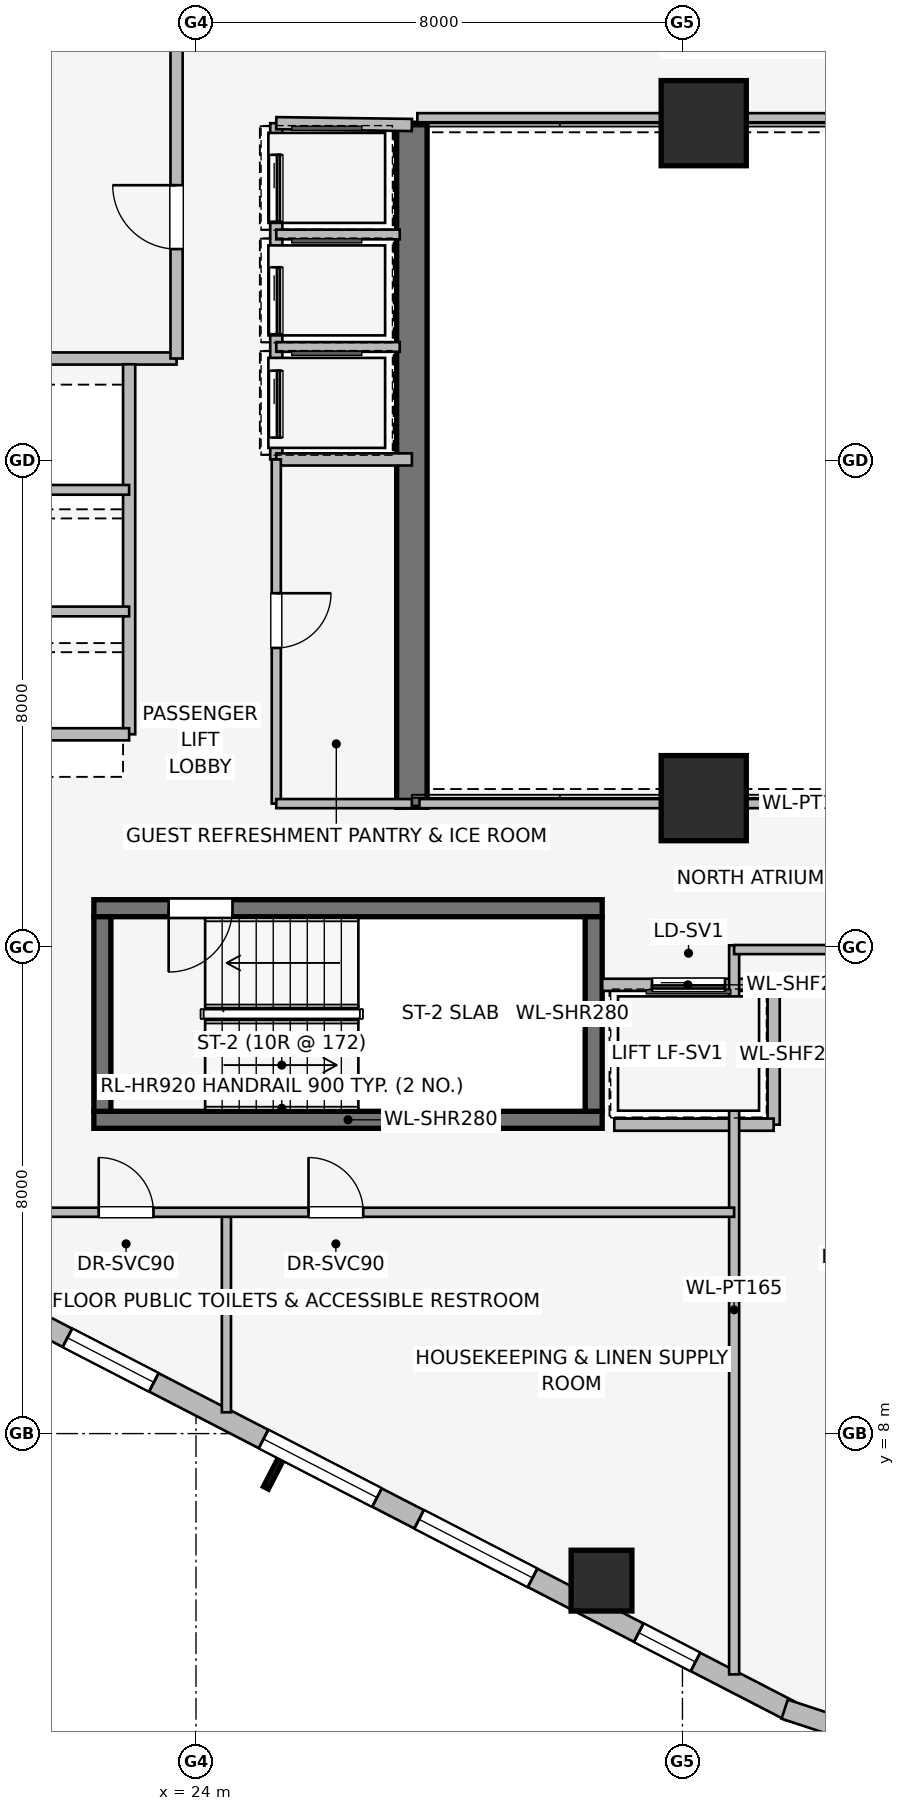
"""IFC4 building model, lengths in metres.
Left out: names, types, materials, properties, quantities, classifications, styles, units other than length and angle.
Written with IfcOpenShell. Run it as: python <this file> out.ifc"""

import sys

from ifc_helpers import new_model, si_unit, direction, frame, frame_2d, origin, origin_2d, place, context, subcontext, project, spatial, rectangle, extrude, element, fill, save


model = new_model("IFC4")
c1 = context("Model", 3, precision=1e-05, world=origin(), true_north=direction((0.0, 1.0)))
c2 = subcontext(c1, "Body", "Model", "MODEL_VIEW")
j1 = project(units=[si_unit("LENGTHUNIT", "METRE"), si_unit("PLANEANGLEUNIT", "RADIAN")], contexts=[c1])
p1 = place(None, origin())
s1 = spatial("IfcSite", under=j1, at=p1, CompositionType="ELEMENT")
p2 = place(p1, origin())
s2 = spatial("IfcBuilding", under=s1, at=p2, CompositionType="ELEMENT")
p3 = place(p2, frame((0.0, 0.0, 136.05)))
s3 = spatial("IfcBuildingStorey", under=s2, at=p3, CompositionType="ELEMENT", Elevation=136.05)
p4 = place(p3, frame((27.55, 29.55, 0.0), z_axis=(0.0, 0.0, 1.0), x_axis=(0.0, -1.0, 0.0)))
e1 = element("IfcWall", 1, at=p4, inside=s3, PredefinedType="SHEAR", context=c2, shape_type="SweptSolid", body=[
    extrude(rectangle(XDim=11.25, YDim=0.5, at=frame_2d((5.625, 0.0))), origin(), (0.0, 0.0, 1.0), 3.45),
])
p5 = place(p3, frame((22.32, 13.16, 0.0), z_axis=(0.0, 0.0, 1.0), x_axis=(1.0, 0.0, 0.0)))
e2 = element("IfcWall", 2, at=p5, inside=s3, PredefinedType="SHEAR", context=c2, shape_type="SweptSolid", body=[
    extrude(rectangle(XDim=8.36, YDim=0.28, at=frame_2d((4.18, 0.0))), origin(), (0.0, 0.0, 1.0), 3.45),
])
p6 = place(p3, frame((30.68, 16.64, 0.0), z_axis=(0.0, 0.0, 1.0), x_axis=(-1.0, 0.0, 0.0)))
e3 = element("IfcWall", 3, at=p6, inside=s3, PredefinedType="SHEAR", context=c2, shape_type="SweptSolid", body=[
    extrude(rectangle(XDim=8.36, YDim=0.28, at=frame_2d((4.18, 0.0))), origin(), (0.0, 0.0, 1.0), 3.45),
])
p7 = place(p6, frame((6.08, 0.0, 0.0)))
e4 = element("IfcOpeningElement", 4, at=p7, cuts=e3, PredefinedType="OPENING", context=c2, shape_type="SweptSolid", body=[
    extrude(rectangle(XDim=1.05, YDim=2.0, at=frame_2d((0.525, 1.0))), frame((0.0, 0.15, 0.0), z_axis=(0.0, -1.0, 0.0), x_axis=(1.0, 0.0, 0.0)), (0.0, 0.0, 1.0), 0.3),
])
for number, where, z_axis, x_axis in (
    (5, (22.46, 16.5, 0.0), (0.0, 0.0, 1.0), (0.0, -1.0, 0.0)),
    (6, (30.54, 13.3, 0.0), (0.0, 0.0, 1.0), (0.0, 1.0, 0.0)),
):
    element("IfcWall", number, at=place(p3, frame(where, z_axis=z_axis, x_axis=x_axis)), inside=s3, PredefinedType="SHEAR", context=c2, shape_type="SweptSolid", body=[
        extrude(rectangle(XDim=3.2, YDim=0.28, at=frame_2d((1.6, 0.0))), origin(), (0.0, 0.0, 1.0), 3.45),
    ])
for number, where, z_axis, x_axis in (
    (7, (32.35, 18.45, 0.0), (0.0, 0.0, 1.0), (1.0, 0.0, 0.0)),
    (8, (32.35, 29.55, 0.0), (0.0, 0.0, 1.0), (1.0, 0.0, 0.0)),
):
    element("IfcColumn", number, at=place(p3, frame(where, z_axis=z_axis, x_axis=x_axis)), inside=s3, PredefinedType="COLUMN", context=c2, shape_type="SweptSolid", body=[
        extrude(rectangle(XDim=1.4, YDim=1.4, at=origin_2d()), origin(), (0.0, 0.0, 1.0), 3.45),
    ])
p8 = place(p3, frame((30.669, 5.582, 0.0), z_axis=(0.0, 0.0, 1.0), x_axis=(1.0, 0.0, 0.0)))
e9 = element("IfcColumn", 9, at=p8, inside=s3, PredefinedType="COLUMN", context=c2, shape_type="SweptSolid", body=[
    extrude(rectangle(XDim=1.0, YDim=1.0, at=origin_2d()), origin(), (0.0, 0.0, 1.0), 3.45),
])
p9 = place(p3, frame((33.769, 3.442, 0.0), z_axis=(0.0, 0.0, 1.0), x_axis=(-0.888613612362, 0.458656568606, 0.0)))
e10 = element("IfcWall", 10, at=p9, inside=s3, PredefinedType="STANDARD", context=c2, shape_type="SweptSolid", body=[
    extrude(rectangle(XDim=18.681, YDim=0.34, at=frame_2d((9.34, 0.0))), origin(), (0.0, 0.0, 1.0), 3.16),
])
p10 = place(p9, frame((1.75, 0.0, 0.75)))
e11 = element("IfcOpeningElement", 11, at=p10, cuts=e10, PredefinedType="OPENING", context=c2, shape_type="SweptSolid", body=[
    extrude(rectangle(XDim=1.05, YDim=1.4, at=frame_2d((0.525, 0.7))), frame((0.0, 0.18, 0.0), z_axis=(0.0, -1.0, 0.0), x_axis=(1.0, 0.0, 0.0)), (0.0, 0.0, 1.0), 0.36),
])
p11 = place(p9, frame((4.765, 0.0, 0.75)))
e12 = element("IfcOpeningElement", 12, at=p11, cuts=e10, PredefinedType="OPENING", context=c2, shape_type="SweptSolid", body=[
    extrude(rectangle(XDim=2.1, YDim=1.5, at=frame_2d((1.05, 0.75))), frame((0.0, 0.18, 0.0), z_axis=(0.0, -1.0, 0.0), x_axis=(1.0, 0.0, 0.0)), (0.0, 0.0, 1.0), 0.36),
])
p12 = place(p9, frame((7.644, 0.0, 0.75)))
e13 = element("IfcOpeningElement", 13, at=p12, cuts=e10, PredefinedType="OPENING", context=c2, shape_type="SweptSolid", body=[
    extrude(rectangle(XDim=2.1, YDim=1.5, at=frame_2d((1.05, 0.75))), frame((0.0, 0.18, 0.0), z_axis=(0.0, -1.0, 0.0), x_axis=(1.0, 0.0, 0.0)), (0.0, 0.0, 1.0), 0.36),
])
p13 = place(p9, frame((11.774, 0.0, 0.75)))
e14 = element("IfcOpeningElement", 14, at=p13, cuts=e10, PredefinedType="OPENING", context=c2, shape_type="SweptSolid", body=[
    extrude(rectangle(XDim=1.6, YDim=1.55, at=frame_2d((0.8, 0.775))), frame((0.0, 0.18, 0.0), z_axis=(0.0, -1.0, 0.0), x_axis=(1.0, 0.0, 0.0)), (0.0, 0.0, 1.0), 0.36),
])
p14 = place(p9, frame((15.92, 0.0, 0.75)))
e15 = element("IfcOpeningElement", 15, at=p14, cuts=e10, PredefinedType="OPENING", context=c2, shape_type="SweptSolid", body=[
    extrude(rectangle(XDim=1.05, YDim=1.4, at=frame_2d((0.525, 0.7))), frame((0.0, 0.18, 0.0), z_axis=(0.0, -1.0, 0.0), x_axis=(1.0, 0.0, 0.0)), (0.0, 0.0, 1.0), 0.36),
])
p15 = place(p3, frame((35.317, 2.93, 0.0), z_axis=(0.0, 0.0, 1.0), x_axis=(-0.949937416267, 0.312440242569, 0.0)))
e16 = element("IfcWall", 16, at=p15, inside=s3, PredefinedType="STANDARD", context=c2, shape_type="SweptSolid", body=[
    extrude(rectangle(XDim=1.722, YDim=0.33, at=frame_2d((0.861, 0.0))), origin(), (0.0, 0.0, 1.0), 3.16),
])
p16 = place(p3, frame((20.793, 25.68, 0.0), z_axis=(0.0, 0.0, 1.0), x_axis=(1.0, 0.0, 0.0)))
e17 = element("IfcWall", 17, at=p16, inside=s3, PredefinedType="PARTITIONING", context=c2, shape_type="SweptSolid", body=[
    extrude(rectangle(XDim=2.887, YDim=0.2, at=frame_2d((1.443, 0.0))), origin(), (0.0, 0.0, 1.0), 3.16),
])
p17 = place(p3, frame((23.68, 25.68, 0.0), z_axis=(0.0, 0.0, 1.0), x_axis=(0.0, 1.0, 0.0)))
e18 = element("IfcWall", 18, at=p17, inside=s3, PredefinedType="PARTITIONING", context=c2, shape_type="SweptSolid", body=[
    extrude(rectangle(XDim=5.54, YDim=0.2, at=frame_2d((2.77, 0.0))), origin(), (0.0, 0.0, 1.0), 3.16),
])
p18 = place(p17, frame((1.8, 0.0, 0.0)))
e19 = element("IfcOpeningElement", 19, at=p18, cuts=e18, PredefinedType="OPENING", context=c2, shape_type="SweptSolid", body=[
    extrude(rectangle(XDim=1.05, YDim=2.0, at=frame_2d((0.525, 1.0))), frame((0.0, 0.11, 0.0), z_axis=(0.0, -1.0, 0.0), x_axis=(1.0, 0.0, 0.0)), (0.0, 0.0, 1.0), 0.22),
])
p19 = place(p3, frame((33.5, 15.38, 0.0), z_axis=(0.0, 0.0, 1.0), x_axis=(-1.0, 0.0, 0.0)))
e20 = element("IfcWall", 20, at=p19, inside=s3, PredefinedType="PARTITIONING", context=c2, shape_type="SweptSolid", body=[
    extrude(rectangle(XDim=2.82, YDim=0.2, at=frame_2d((1.41, 0.0))), origin(), (0.0, 0.0, 1.0), 3.16),
])
p20 = place(p19, frame((0.8, 0.0, 0.0)))
e21 = element("IfcOpeningElement", 21, at=p20, cuts=e20, PredefinedType="OPENING", context=c2, shape_type="SweptSolid", body=[
    extrude(rectangle(XDim=1.2, YDim=2.2, at=frame_2d((0.6, 1.1))), frame((0.0, 0.11, 0.0), z_axis=(0.0, -1.0, 0.0), x_axis=(1.0, 0.0, 0.0)), (0.0, 0.0, 1.0), 0.22),
])
p21 = place(p3, frame((33.5, 13.08, 0.0), z_axis=(0.0, 0.0, 1.0), x_axis=(0.0, 1.0, 0.0)))
e22 = element("IfcWall", 22, at=p21, inside=s3, PredefinedType="PARTITIONING", context=c2, shape_type="SweptSolid", body=[
    extrude(rectangle(XDim=2.3, YDim=0.2, at=frame_2d((1.15, 0.0))), origin(), (0.0, 0.0, 1.0), 3.16),
])
p22 = place(p3, frame((30.879, 13.08, 0.0), z_axis=(0.0, 0.0, 1.0), x_axis=(1.0, 0.0, 0.0)))
e23 = element("IfcWall", 23, at=p22, inside=s3, PredefinedType="PARTITIONING", context=c2, shape_type="SweptSolid", body=[
    extrude(rectangle(XDim=2.621, YDim=0.2, at=frame_2d((1.311, 0.0))), origin(), (0.0, 0.0, 1.0), 3.16),
])
p23 = place(p3, frame((22.9, 19.5, 0.0), z_axis=(0.0, 0.0, 1.0), x_axis=(0.0, 1.0, 0.0)))
e24 = element("IfcWall", 24, at=p23, inside=s3, PredefinedType="PARTITIONING", context=c2, shape_type="SweptSolid", body=[
    extrude(rectangle(XDim=6.085, YDim=0.2, at=frame_2d((3.042, 0.0))), origin(), (0.0, 0.0, 1.0), 3.16),
])
p24 = place(p3, frame((20.49, 19.5, 0.0), z_axis=(0.0, 0.0, 1.0), x_axis=(1.0, 0.0, 0.0)))
e25 = element("IfcWall", 25, at=p24, inside=s3, PredefinedType="PARTITIONING", context=c2, shape_type="SweptSolid", body=[
    extrude(rectangle(XDim=2.41, YDim=0.2, at=frame_2d((1.205, 0.0))), origin(), (0.0, 0.0, 1.0), 2.06),
])
for number, where, z_axis, x_axis in (
    (26, (20.55, 21.52, 0.0), (0.0, 0.0, 1.0), (1.0, 0.0, 0.0)),
    (27, (20.55, 23.52, 0.0), (0.0, 0.0, 1.0), (1.0, 0.0, 0.0)),
):
    element("IfcWall", number, at=place(p3, frame(where, z_axis=z_axis, x_axis=x_axis)), inside=s3, PredefinedType="PARTITIONING", context=c2, shape_type="SweptSolid", body=[
        extrude(rectangle(XDim=2.35, YDim=0.16, at=frame_2d((1.175, 0.0))), origin(), (0.0, 0.0, 1.0), 3.16),
    ])
p25 = place(p3, frame((25.32, 29.55, 0.0), z_axis=(0.0, 0.0, 1.0), x_axis=(0.0, -1.0, 0.0)))
e28 = element("IfcWall", 28, at=p25, inside=s3, PredefinedType="PARTITIONING", context=c2, shape_type="SweptSolid", body=[
    extrude(rectangle(XDim=5.53, YDim=0.2, at=frame_2d((2.765, 0.0))), origin(), (0.0, 0.0, 1.0), 3.16),
])
p26 = place(p25, frame((0.52, 0.0, 0.0)))
e29 = element("IfcOpeningElement", 29, at=p26, cuts=e28, PredefinedType="OPENING", context=c2, shape_type="SweptSolid", body=[
    extrude(rectangle(XDim=1.1, YDim=2.2, at=frame_2d((0.55, 1.1))), frame((0.0, 0.11, 0.0), z_axis=(0.0, -1.0, 0.0), x_axis=(1.0, 0.0, 0.0)), (0.0, 0.0, 1.0), 0.22),
])
p27 = place(p25, frame((2.37, 0.0, 0.0)))
e30 = element("IfcOpeningElement", 30, at=p27, cuts=e28, PredefinedType="OPENING", context=c2, shape_type="SweptSolid", body=[
    extrude(rectangle(XDim=1.1, YDim=2.2, at=frame_2d((0.55, 1.1))), frame((0.0, 0.11, 0.0), z_axis=(0.0, -1.0, 0.0), x_axis=(1.0, 0.0, 0.0)), (0.0, 0.0, 1.0), 0.22),
])
p28 = place(p25, frame((4.07, 0.0, 0.0)))
e31 = element("IfcOpeningElement", 31, at=p28, cuts=e28, PredefinedType="OPENING", context=c2, shape_type="SweptSolid", body=[
    extrude(rectangle(XDim=1.1, YDim=2.2, at=frame_2d((0.55, 1.1))), frame((0.0, 0.11, 0.0), z_axis=(0.0, -1.0, 0.0), x_axis=(1.0, 0.0, 0.0)), (0.0, 0.0, 1.0), 0.22),
])
p29 = place(p3, frame((27.55, 29.52, 0.0), z_axis=(0.0, 0.0, 1.0), x_axis=(-0.999909343457, 0.013464949556, 0.0)))
e32 = element("IfcWall", 32, at=p29, inside=s3, PredefinedType="PARTITIONING", context=c2, shape_type="SweptSolid", body=[
    extrude(rectangle(XDim=2.23, YDim=0.2, at=frame_2d((1.115, 0.0))), origin(), (0.0, 0.0, 1.0), 2.06),
])
p30 = place(p3, frame((25.32, 24.02, 0.0), z_axis=(0.0, 0.0, 1.0), x_axis=(1.0, 0.0, 0.0)))
e33 = element("IfcWall", 33, at=p30, inside=s3, PredefinedType="PARTITIONING", context=c2, shape_type="SweptSolid", body=[
    extrude(rectangle(XDim=2.23, YDim=0.2, at=frame_2d((1.115, 0.0))), origin(), (0.0, 0.0, 1.0), 3.16),
])
for number, where, z_axis, x_axis in (
    (34, (25.32, 25.87, 0.0), (0.0, 0.0, 1.0), (1.0, 0.0, 0.0)),
    (35, (25.32, 27.72, 0.0), (0.0, 0.0, 1.0), (1.0, 0.0, 0.0)),
):
    element("IfcWall", number, at=place(p3, frame(where, z_axis=z_axis, x_axis=x_axis)), inside=s3, PredefinedType="PARTITIONING", context=c2, shape_type="SweptSolid", body=[
        extrude(rectangle(XDim=2.03, YDim=0.16, at=frame_2d((1.015, 0.0))), origin(), (0.0, 0.0, 1.0), 3.16),
    ])
p31 = place(p3, frame((25.32, 24.02, 0.0), z_axis=(0.0, 0.0, 1.0), x_axis=(0.0, -1.0, 0.0)))
e36 = element("IfcWall", 36, at=p31, inside=s3, PredefinedType="PARTITIONING", context=c2, shape_type="SweptSolid", body=[
    extrude(rectangle(XDim=5.66, YDim=0.15, at=frame_2d((2.83, 0.0))), origin(), (0.0, 0.0, 1.0), 3.16),
])
p32 = place(p31, frame((2.2, 0.0, 0.0)))
e37 = element("IfcOpeningElement", 37, at=p32, cuts=e36, PredefinedType="OPENING", context=c2, shape_type="SweptSolid", body=[
    extrude(rectangle(XDim=0.9, YDim=2.0, at=frame_2d((0.45, 1.0))), frame((0.0, 0.085, 0.0), z_axis=(0.0, -1.0, 0.0), x_axis=(1.0, 0.0, 0.0)), (0.0, 0.0, 1.0), 0.17),
])
p33 = place(p3, frame((25.32, 18.36, 0.0), z_axis=(0.0, 0.0, 1.0), x_axis=(1.0, 0.0, 0.0)))
e38 = element("IfcWall", 38, at=p33, inside=s3, PredefinedType="PARTITIONING", context=c2, shape_type="SweptSolid", body=[
    extrude(rectangle(XDim=2.23, YDim=0.15, at=frame_2d((1.115, 0.0))), origin(), (0.0, 0.0, 1.0), 3.16),
])
p34 = place(p3, frame((27.675, 18.36, 0.0), z_axis=(0.0, 0.0, 1.0), x_axis=(1.0, 0.0, 0.0)))
e39 = element("IfcWall", 39, at=p34, inside=s3, PredefinedType="PARTITIONING", context=c2, shape_type="SweptSolid", body=[
    extrude(rectangle(XDim=12.165, YDim=0.15, at=frame_2d((6.083, 0.0))), origin(), (0.0, 0.0, 1.0), 2.301),
])
p35 = place(p3, frame((39.84, 29.64, 0.0), z_axis=(0.0, 0.0, 1.0), x_axis=(-1.0, 0.0, 0.0)))
e40 = element("IfcWall", 40, at=p35, inside=s3, PredefinedType="PARTITIONING", context=c2, shape_type="SweptSolid", body=[
    extrude(rectangle(XDim=12.2, YDim=0.15, at=frame_2d((6.1, 0.0))), origin(), (0.0, 0.0, 1.0), 2.301),
])
p36 = place(p3, frame((32.85, 4.04, 0.0), z_axis=(0.0, 0.0, 1.0), x_axis=(0.0, 1.0, 0.0)))
e41 = element("IfcWall", 41, at=p36, inside=s3, PredefinedType="PARTITIONING", context=c2, shape_type="SweptSolid", body=[
    extrude(rectangle(XDim=11.99, YDim=0.165, at=frame_2d((5.995, 0.0))), origin(), (0.0, 0.0, 1.0), 3.16),
])
p37 = place(p3, frame((24.5, 8.35, 0.0), z_axis=(0.0, 0.0, 1.0), x_axis=(0.0, 1.0, 0.0)))
e42 = element("IfcWall", 42, at=p37, inside=s3, PredefinedType="PARTITIONING", context=c2, shape_type="SweptSolid", body=[
    extrude(rectangle(XDim=3.29, YDim=0.15, at=frame_2d((1.645, 0.0))), origin(), (0.0, 0.0, 1.0), 3.16),
])
p38 = place(p3, frame((18.126, 11.64, 0.0), z_axis=(0.0, 0.0, 1.0), x_axis=(1.0, 0.0, 0.0)))
e43 = element("IfcWall", 43, at=p38, inside=s3, PredefinedType="PARTITIONING", context=c2, shape_type="SweptSolid", body=[
    extrude(rectangle(XDim=14.724, YDim=0.15, at=frame_2d((7.362, 0.0))), origin(), (0.0, 0.0, 1.0), 3.16),
])
p39 = place(p38, frame((4.274, 0.0, 0.0)))
e44 = element("IfcOpeningElement", 44, at=p39, cuts=e43, PredefinedType="OPENING", context=c2, shape_type="SweptSolid", body=[
    extrude(rectangle(XDim=0.9, YDim=2.0, at=frame_2d((0.45, 1.0))), frame((0.0, 0.085, 0.0), z_axis=(0.0, -1.0, 0.0), x_axis=(1.0, 0.0, 0.0)), (0.0, 0.0, 1.0), 0.17),
])
p40 = place(p38, frame((7.724, 0.0, 0.0)))
e45 = element("IfcOpeningElement", 45, at=p40, cuts=e43, PredefinedType="OPENING", context=c2, shape_type="SweptSolid", body=[
    extrude(rectangle(XDim=0.9, YDim=2.0, at=frame_2d((0.45, 1.0))), frame((0.0, 0.085, 0.0), z_axis=(0.0, -1.0, 0.0), x_axis=(1.0, 0.0, 0.0)), (0.0, 0.0, 1.0), 0.17),
])
p41 = place(p3, frame((32.85, 15.96, 0.0), z_axis=(0.0, 0.0, 1.0), x_axis=(1.0, 0.0, 0.0)))
e46 = element("IfcWall", 46, at=p41, inside=s3, PredefinedType="PARTITIONING", context=c2, shape_type="SweptSolid", body=[
    extrude(rectangle(XDim=24.358, YDim=0.15, at=frame_2d((12.179, 0.0))), origin(), (0.0, 0.0, 1.0), 3.16),
])
p42 = place(p41, frame((11.713, 0.0, 0.0)))
e47 = element("IfcOpeningElement", 47, at=p42, cuts=e46, PredefinedType="OPENING", context=c2, shape_type="SweptSolid", body=[
    extrude(rectangle(XDim=0.96, YDim=2.0, at=frame_2d((0.48, 1.0))), frame((0.0, 0.085, 0.0), z_axis=(0.0, -1.0, 0.0), x_axis=(1.0, 0.0, 0.0)), (0.0, 0.0, 1.0), 0.17),
])
p43 = place(p10, origin())
e48 = element("IfcWindow", 48, at=p43, inside=s3, PartitioningType="SINGLE_PANEL", PredefinedType="WINDOW", context=c2, shape_type="SweptSolid", body=[
    extrude(rectangle(XDim=1.05, YDim=1.4, at=frame_2d((0.525, 0.7))), frame((0.0, 0.03, 0.0), z_axis=(0.0, -1.0, 0.0), x_axis=(1.0, 0.0, 0.0)), (0.0, 0.0, 1.0), 0.06),
])
fill(e11, e48)
p44 = place(p11, origin())
e49 = element("IfcWindow", 49, at=p44, inside=s3, PartitioningType="SINGLE_PANEL", PredefinedType="WINDOW", context=c2, shape_type="SweptSolid", body=[
    extrude(rectangle(XDim=2.1, YDim=1.5, at=frame_2d((1.05, 0.75))), frame((0.0, 0.03, 0.0), z_axis=(0.0, -1.0, 0.0), x_axis=(1.0, 0.0, 0.0)), (0.0, 0.0, 1.0), 0.06),
])
fill(e12, e49)
p45 = place(p12, origin())
e50 = element("IfcWindow", 50, at=p45, inside=s3, PartitioningType="SINGLE_PANEL", PredefinedType="WINDOW", context=c2, shape_type="SweptSolid", body=[
    extrude(rectangle(XDim=2.1, YDim=1.5, at=frame_2d((1.05, 0.75))), frame((0.0, 0.03, 0.0), z_axis=(0.0, -1.0, 0.0), x_axis=(1.0, 0.0, 0.0)), (0.0, 0.0, 1.0), 0.06),
])
fill(e13, e50)
p46 = place(p13, origin())
e51 = element("IfcWindow", 51, at=p46, inside=s3, PartitioningType="SINGLE_PANEL", PredefinedType="WINDOW", context=c2, shape_type="SweptSolid", body=[
    extrude(rectangle(XDim=1.6, YDim=1.55, at=frame_2d((0.8, 0.775))), frame((0.0, 0.03, 0.0), z_axis=(0.0, -1.0, 0.0), x_axis=(1.0, 0.0, 0.0)), (0.0, 0.0, 1.0), 0.06),
])
fill(e14, e51)
p47 = place(p7, origin())
e52 = element("IfcDoor", 52, at=p47, inside=s3, OperationType="SINGLE_SWING_RIGHT", PredefinedType="DOOR", context=c2, shape_type="SweptSolid", body=[
    extrude(rectangle(XDim=1.05, YDim=2.0, at=frame_2d((0.525, 1.0))), frame((0.0, 0.025, 0.0), z_axis=(0.0, -1.0, 0.0), x_axis=(1.0, 0.0, 0.0)), (0.0, 0.0, 1.0), 0.05),
])
fill(e4, e52)
p48 = place(p18, origin())
e53 = element("IfcDoor", 53, at=p48, inside=s3, OperationType="SINGLE_SWING_RIGHT", PredefinedType="DOOR", context=c2, shape_type="SweptSolid", body=[
    extrude(rectangle(XDim=1.05, YDim=2.0, at=frame_2d((0.525, 1.0))), frame((0.0, 0.025, 0.0), z_axis=(0.0, -1.0, 0.0), x_axis=(1.0, 0.0, 0.0)), (0.0, 0.0, 1.0), 0.05),
])
fill(e19, e53)
p49 = place(p20, origin())
e54 = element("IfcDoor", 54, at=p49, inside=s3, OperationType="SLIDING_TO_RIGHT", PredefinedType="DOOR", context=c2, shape_type="SweptSolid", body=[
    extrude(rectangle(XDim=1.2, YDim=2.2, at=frame_2d((0.6, 1.1))), frame((0.0, 0.025, 0.0), z_axis=(0.0, -1.0, 0.0), x_axis=(1.0, 0.0, 0.0)), (0.0, 0.0, 1.0), 0.05),
])
fill(e21, e54)
p50 = place(p26, origin())
e55 = element("IfcDoor", 55, at=p50, inside=s3, OperationType="SLIDING_TO_LEFT", PredefinedType="DOOR", context=c2, shape_type="SweptSolid", body=[
    extrude(rectangle(XDim=1.1, YDim=2.2, at=frame_2d((0.55, 1.1))), frame((0.0, 0.025, 0.0), z_axis=(0.0, -1.0, 0.0), x_axis=(1.0, 0.0, 0.0)), (0.0, 0.0, 1.0), 0.05),
])
fill(e29, e55)
p51 = place(p27, origin())
e56 = element("IfcDoor", 56, at=p51, inside=s3, OperationType="SLIDING_TO_LEFT", PredefinedType="DOOR", context=c2, shape_type="SweptSolid", body=[
    extrude(rectangle(XDim=1.1, YDim=2.2, at=frame_2d((0.55, 1.1))), frame((0.0, 0.025, 0.0), z_axis=(0.0, -1.0, 0.0), x_axis=(1.0, 0.0, 0.0)), (0.0, 0.0, 1.0), 0.05),
])
fill(e30, e56)
p52 = place(p28, origin())
e57 = element("IfcDoor", 57, at=p52, inside=s3, OperationType="SLIDING_TO_LEFT", PredefinedType="DOOR", context=c2, shape_type="SweptSolid", body=[
    extrude(rectangle(XDim=1.1, YDim=2.2, at=frame_2d((0.55, 1.1))), frame((0.0, 0.025, 0.0), z_axis=(0.0, -1.0, 0.0), x_axis=(1.0, 0.0, 0.0)), (0.0, 0.0, 1.0), 0.05),
])
fill(e31, e57)
p53 = place(p32, origin())
e58 = element("IfcDoor", 58, at=p53, inside=s3, OperationType="SINGLE_SWING_LEFT", PredefinedType="DOOR", context=c2, shape_type="SweptSolid", body=[
    extrude(rectangle(XDim=0.9, YDim=2.0, at=frame_2d((0.45, 1.0))), frame((0.0, 0.025, 0.0), z_axis=(0.0, -1.0, 0.0), x_axis=(1.0, 0.0, 0.0)), (0.0, 0.0, 1.0), 0.05),
])
fill(e37, e58)
p54 = place(p39, origin())
e59 = element("IfcDoor", 59, at=p54, inside=s3, OperationType="SINGLE_SWING_LEFT", PredefinedType="DOOR", context=c2, shape_type="SweptSolid", body=[
    extrude(rectangle(XDim=0.9, YDim=2.0, at=frame_2d((0.45, 1.0))), frame((0.0, 0.025, 0.0), z_axis=(0.0, -1.0, 0.0), x_axis=(1.0, 0.0, 0.0)), (0.0, 0.0, 1.0), 0.05),
])
fill(e44, e59)
p55 = place(p40, origin())
e60 = element("IfcDoor", 60, at=p55, inside=s3, OperationType="SINGLE_SWING_LEFT", PredefinedType="DOOR", context=c2, shape_type="SweptSolid", body=[
    extrude(rectangle(XDim=0.9, YDim=2.0, at=frame_2d((0.45, 1.0))), frame((0.0, 0.025, 0.0), z_axis=(0.0, -1.0, 0.0), x_axis=(1.0, 0.0, 0.0)), (0.0, 0.0, 1.0), 0.05),
])
fill(e45, e60)
save(model, sys.argv[1])
